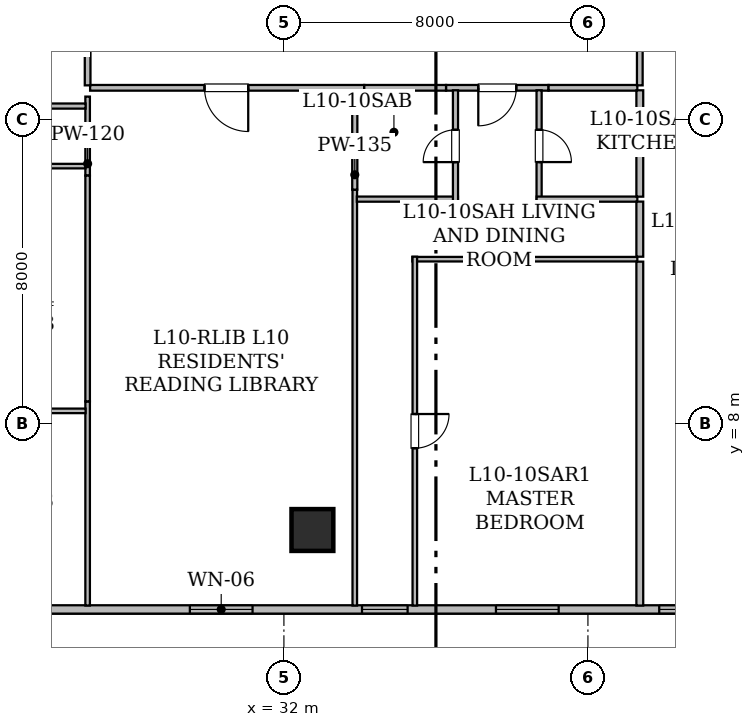
"""IFC4 building model, lengths in metres.
Left out: names, types, materials, properties, quantities, classifications, styles, units other than length and angle.
Written with IfcOpenShell. Run it as: python <this file> out.ifc"""

import sys

from ifc_helpers import new_model, si_unit, direction, frame, frame_2d, origin, origin_2d, place, context, subcontext, project, spatial, rectangle, hollow_rectangle, extrude, element, fill, save


model = new_model("IFC4")
c1 = context("Model", 3, precision=1e-05, world=origin(), true_north=direction((0.0, 1.0)))
c2 = subcontext(c1, "Body", "Model", "MODEL_VIEW")
j1 = project(units=[si_unit("LENGTHUNIT", "METRE"), si_unit("PLANEANGLEUNIT", "RADIAN")], contexts=[c1])
p1 = place(None, origin())
s1 = spatial("IfcSite", under=j1, at=p1, CompositionType="ELEMENT")
p2 = place(p1, origin())
s2 = spatial("IfcBuilding", under=s1, at=p2, CompositionType="ELEMENT")
p3 = place(p2, frame((0.0, 0.0, 44.25)))
s3 = spatial("IfcBuildingStorey", under=s2, at=p3, CompositionType="ELEMENT", Elevation=44.25)
p4 = place(p3, frame((32.75, 5.2, 0.0), z_axis=(0.0, 0.0, 1.0), x_axis=(1.0, 0.0, 0.0)))
e1 = element("IfcColumn", 1, at=p4, inside=s3, PredefinedType="COLUMN", context=c2, shape_type="SweptSolid", body=[
    extrude(hollow_rectangle(XDim=1.1, YDim=1.1, WallThickness=0.055, at=origin_2d()), origin(), (0.0, 0.0, 1.0), 3.65),
])
p5 = place(p3, frame((45.683, 3.11, 0.0), z_axis=(0.0, 0.0, 1.0), x_axis=(-1.0, 0.0, 0.0)))
e2 = element("IfcWall", 2, at=p5, inside=s3, PredefinedType="STANDARD", context=c2, shape_type="SweptSolid", body=[
    extrude(rectangle(XDim=37.368, YDim=0.22, at=frame_2d((18.684, 0.0))), origin(), (0.0, 0.0, 1.0), 3.43),
])
p6 = place(p5, frame((14.508, 0.0, 0.85)))
e3 = element("IfcOpeningElement", 3, at=p6, cuts=e2, PredefinedType="OPENING", context=c2, shape_type="SweptSolid", body=[
    extrude(rectangle(XDim=1.65, YDim=1.55, at=frame_2d((0.825, 0.775))), frame((0.0, 0.12, 0.0), z_axis=(0.0, -1.0, 0.0), x_axis=(1.0, 0.0, 0.0)), (0.0, 0.0, 1.0), 0.24),
])
p7 = place(p5, frame((33.025, 0.0, 0.85)))
e4 = element("IfcOpeningElement", 4, at=p7, cuts=e2, PredefinedType="OPENING", context=c2, shape_type="SweptSolid", body=[
    extrude(rectangle(XDim=1.65, YDim=1.55, at=frame_2d((0.825, 0.775))), frame((0.0, 0.12, 0.0), z_axis=(0.0, -1.0, 0.0), x_axis=(1.0, 0.0, 0.0)), (0.0, 0.0, 1.0), 0.24),
])
p8 = place(p5, frame((24.713, 0.0, 0.8)))
e5 = element("IfcOpeningElement", 5, at=p8, cuts=e2, PredefinedType="OPENING", context=c2, shape_type="SweptSolid", body=[
    extrude(rectangle(XDim=1.2, YDim=1.5, at=frame_2d((0.6, 0.75))), frame((0.0, 0.12, 0.0), z_axis=(0.0, -1.0, 0.0), x_axis=(1.0, 0.0, 0.0)), (0.0, 0.0, 1.0), 0.24),
])
p9 = place(p5, frame((28.113, 0.0, 0.85)))
e6 = element("IfcOpeningElement", 6, at=p9, cuts=e2, PredefinedType="OPENING", context=c2, shape_type="SweptSolid", body=[
    extrude(rectangle(XDim=1.65, YDim=1.55, at=frame_2d((0.825, 0.775))), frame((0.0, 0.12, 0.0), z_axis=(0.0, -1.0, 0.0), x_axis=(1.0, 0.0, 0.0)), (0.0, 0.0, 1.0), 0.24),
])
p10 = place(p5, frame((20.863, 0.0, 0.85)))
e7 = element("IfcOpeningElement", 7, at=p10, cuts=e2, PredefinedType="OPENING", context=c2, shape_type="SweptSolid", body=[
    extrude(rectangle(XDim=1.65, YDim=1.55, at=frame_2d((0.825, 0.775))), frame((0.0, 0.12, 0.0), z_axis=(0.0, -1.0, 0.0), x_axis=(1.0, 0.0, 0.0)), (0.0, 0.0, 1.0), 0.24),
])
p11 = place(p5, frame((10.428, 0.0, 0.8)))
e8 = element("IfcOpeningElement", 8, at=p11, cuts=e2, PredefinedType="OPENING", context=c2, shape_type="SweptSolid", body=[
    extrude(rectangle(XDim=1.2, YDim=1.5, at=frame_2d((0.6, 0.75))), frame((0.0, 0.12, 0.0), z_axis=(0.0, -1.0, 0.0), x_axis=(1.0, 0.0, 0.0)), (0.0, 0.0, 1.0), 0.24),
])
p12 = place(p5, frame((6.453, 0.0, 0.85)))
e9 = element("IfcOpeningElement", 9, at=p12, cuts=e2, PredefinedType="OPENING", context=c2, shape_type="SweptSolid", body=[
    extrude(rectangle(XDim=1.65, YDim=1.55, at=frame_2d((0.825, 0.775))), frame((0.0, 0.12, 0.0), z_axis=(0.0, -1.0, 0.0), x_axis=(1.0, 0.0, 0.0)), (0.0, 0.0, 1.0), 0.24),
])
p13 = place(p5, frame((2.157, 0.0, 0.85)))
e10 = element("IfcOpeningElement", 10, at=p13, cuts=e2, PredefinedType="OPENING", context=c2, shape_type="SweptSolid", body=[
    extrude(rectangle(XDim=1.65, YDim=1.55, at=frame_2d((0.825, 0.775))), frame((0.0, 0.12, 0.0), z_axis=(0.0, -1.0, 0.0), x_axis=(1.0, 0.0, 0.0)), (0.0, 0.0, 1.0), 0.24),
])
p14 = place(p3, frame((34.114, 16.835, 0.0), z_axis=(0.0, 0.0, 1.0), x_axis=(-1.0, 0.0, 0.0)))
e11 = element("IfcWall", 11, at=p14, inside=s3, PredefinedType="STANDARD", context=c2, shape_type="SweptSolid", body=[
    extrude(rectangle(XDim=7.214, YDim=0.15, at=frame_2d((3.607, 0.0))), origin(), (0.0, 0.0, 1.0), 2.647),
])
p15 = place(p14, frame((3.053, 0.0, 0.0)))
e12 = element("IfcOpeningElement", 12, at=p15, cuts=e11, PredefinedType="OPENING", context=c2, shape_type="SweptSolid", body=[
    extrude(rectangle(XDim=1.15, YDim=2.2, at=frame_2d((0.575, 1.1))), frame((0.0, 0.085, 0.0), z_axis=(0.0, -1.0, 0.0), x_axis=(1.0, 0.0, 0.0)), (0.0, 0.0, 1.0), 0.17),
])
p16 = place(p3, frame((26.835, 16.9, 0.0), z_axis=(0.0, 0.0, 1.0), x_axis=(0.0, 1.0, 0.0)))
e13 = element("IfcWall", 13, at=p16, inside=s3, PredefinedType="STANDARD", context=c2, shape_type="SweptSolid", body=[
    extrude(rectangle(XDim=3.1, YDim=0.15, at=frame_2d((1.55, 0.0))), origin(), (0.0, 0.0, 1.0), 2.647),
])
p17 = place(p3, frame((38.964, 16.835, 0.0), z_axis=(0.0, 0.0, 1.0), x_axis=(-1.0, 0.0, 0.0)))
e14 = element("IfcWall", 14, at=p17, inside=s3, PredefinedType="STANDARD", context=c2, shape_type="SweptSolid", body=[
    extrude(rectangle(XDim=2.698, YDim=0.15, at=frame_2d((1.349, 0.0))), origin(), (0.0, 0.0, 1.0), 3.43),
])
p18 = place(p17, frame((0.849, 0.0, 0.0)))
e15 = element("IfcOpeningElement", 15, at=p18, cuts=e14, PredefinedType="OPENING", context=c2, shape_type="SweptSolid", body=[
    extrude(rectangle(XDim=1.0, YDim=2.15, at=frame_2d((0.5, 1.075))), frame((0.0, 0.085, 0.0), z_axis=(0.0, -1.0, 0.0), x_axis=(1.0, 0.0, 0.0)), (0.0, 0.0, 1.0), 0.17),
])
p19 = place(p3, frame((36.266, 16.835, 0.0), z_axis=(0.0, 0.0, 1.0), x_axis=(-1.0, 0.0, 0.0)))
e16 = element("IfcWall", 16, at=p19, inside=s3, PredefinedType="STANDARD", context=c2, shape_type="SweptSolid", body=[
    extrude(rectangle(XDim=2.152, YDim=0.15, at=frame_2d((1.076, 0.0))), origin(), (0.0, 0.0, 1.0), 3.43),
])
p20 = place(p3, frame((41.3, 16.835, 0.0), z_axis=(0.0, 0.0, 1.0), x_axis=(-1.0, 0.0, 0.0)))
e17 = element("IfcWall", 17, at=p20, inside=s3, PredefinedType="STANDARD", context=c2, shape_type="SweptSolid", body=[
    extrude(rectangle(XDim=2.336, YDim=0.15, at=frame_2d((1.168, 0.0))), origin(), (0.0, 0.0, 1.0), 3.43),
])
p21 = place(p3, frame((41.365, 18.618, 0.0), z_axis=(0.0, 0.0, 1.0), x_axis=(0.0, -1.0, 0.0)))
e18 = element("IfcWall", 18, at=p21, inside=s3, PredefinedType="STANDARD", context=c2, shape_type="SweptSolid", body=[
    extrude(rectangle(XDim=1.718, YDim=0.15, at=frame_2d((0.859, 0.0))), origin(), (0.0, 0.0, 1.0), 2.647),
])
p22 = place(p3, frame((26.835, 14.526, 0.0), z_axis=(0.0, 0.0, 1.0), x_axis=(0.0, 1.0, 0.0)))
e19 = element("IfcWall", 19, at=p22, inside=s3, PredefinedType="PARTITIONING", context=c2, shape_type="SweptSolid", body=[
    extrude(rectangle(XDim=2.078, YDim=0.12, at=frame_2d((1.039, 0.0))), origin(), (0.0, 0.0, 1.0), 3.43),
])
p23 = place(p3, frame((26.835, 3.212, 0.0), z_axis=(0.0, 0.0, 1.0), x_axis=(0.0, 1.0, 0.0)))
e20 = element("IfcWall", 20, at=p23, inside=s3, PredefinedType="PARTITIONING", context=c2, shape_type="SweptSolid", body=[
    extrude(rectangle(XDim=5.372, YDim=0.12, at=frame_2d((2.686, 0.0))), origin(), (0.0, 0.0, 1.0), 2.803),
])
p24 = place(p3, frame((26.835, 8.584, 0.0), z_axis=(0.0, 0.0, 1.0), x_axis=(0.0, 1.0, 0.0)))
e21 = element("IfcWall", 21, at=p24, inside=s3, PredefinedType="PARTITIONING", context=c2, shape_type="SweptSolid", body=[
    extrude(rectangle(XDim=5.942, YDim=0.12, at=frame_2d((2.971, 0.0))), origin(), (0.0, 0.0, 1.0), 3.43),
])
p25 = place(p3, frame((33.865, 14.155, 0.0), z_axis=(0.0, 0.0, 1.0), x_axis=(0.0, -1.0, 0.0)))
e22 = element("IfcWall", 22, at=p25, inside=s3, PredefinedType="PARTITIONING", context=c2, shape_type="SweptSolid", body=[
    extrude(rectangle(XDim=10.943, YDim=0.12, at=frame_2d((5.472, 0.0))), origin(), (0.0, 0.0, 1.0), 2.803),
])
p26 = place(p3, frame((33.865, 16.77, 0.0), z_axis=(0.0, 0.0, 1.0), x_axis=(0.0, -1.0, 0.0)))
e23 = element("IfcWall", 23, at=p26, inside=s3, PredefinedType="PARTITIONING", context=c2, shape_type="SweptSolid", body=[
    extrude(rectangle(XDim=2.615, YDim=0.135, at=frame_2d((1.308, 0.0))), origin(), (0.0, 0.0, 1.0), 3.43),
])
p27 = place(p3, frame((21.405, 16.355, 0.0), z_axis=(0.0, 0.0, 1.0), x_axis=(1.0, 0.0, 0.0)))
e24 = element("IfcWall", 24, at=p27, inside=s3, PredefinedType="PARTITIONING", context=c2, shape_type="SweptSolid", body=[
    extrude(rectangle(XDim=5.376, YDim=0.135, at=frame_2d((2.688, 0.0))), origin(), (0.0, 0.0, 1.0), 3.43),
])
p28 = place(p27, frame((2.263, 0.0, 0.0)))
e25 = element("IfcOpeningElement", 25, at=p28, cuts=e24, PredefinedType="OPENING", context=c2, shape_type="SweptSolid", body=[
    extrude(rectangle(XDim=0.85, YDim=2.1, at=frame_2d((0.425, 1.05))), frame((0.0, 0.077, 0.0), z_axis=(0.0, -1.0, 0.0), x_axis=(1.0, 0.0, 0.0)), (0.0, 0.0, 1.0), 0.155),
])
p29 = place(p3, frame((26.781, 14.775, 0.0), z_axis=(0.0, 0.0, 1.0), x_axis=(-1.0, 0.0, 0.0)))
e26 = element("IfcWall", 26, at=p29, inside=s3, PredefinedType="PARTITIONING", context=c2, shape_type="SweptSolid", body=[
    extrude(rectangle(XDim=5.691, YDim=0.12, at=frame_2d((2.845, 0.0))), origin(), (0.0, 0.0, 1.0), 3.43),
])
p30 = place(p3, frame((21.209, 8.335, 0.0), z_axis=(0.0, 0.0, 1.0), x_axis=(1.0, 0.0, 0.0)))
e27 = element("IfcWall", 27, at=p30, inside=s3, PredefinedType="PARTITIONING", context=c2, shape_type="SweptSolid", body=[
    extrude(rectangle(XDim=5.572, YDim=0.12, at=frame_2d((2.786, 0.0))), origin(), (0.0, 0.0, 1.0), 3.43),
])
p31 = place(p3, frame((33.919, 13.906, 0.0), z_axis=(0.0, 0.0, 1.0), x_axis=(1.0, 0.0, 0.0)))
e28 = element("IfcWall", 28, at=p31, inside=s3, PredefinedType="PARTITIONING", context=c2, shape_type="SweptSolid", body=[
    extrude(rectangle(XDim=2.661, YDim=0.135, at=frame_2d((1.331, 0.0))), origin(), (0.0, 0.0, 1.0), 3.43),
])
p32 = place(p3, frame((36.515, 13.841, 0.0), z_axis=(0.0, 0.0, 1.0), x_axis=(0.0, 1.0, 0.0)))
e29 = element("IfcWall", 29, at=p32, inside=s3, PredefinedType="PARTITIONING", context=c2, shape_type="SweptSolid", body=[
    extrude(rectangle(XDim=2.929, YDim=0.135, at=frame_2d((1.464, 0.0))), origin(), (0.0, 0.0, 1.0), 3.43),
])
p33 = place(p32, frame((1.039, 0.0, 0.0)))
e30 = element("IfcOpeningElement", 30, at=p33, cuts=e29, PredefinedType="OPENING", context=c2, shape_type="SweptSolid", body=[
    extrude(rectangle(XDim=0.85, YDim=2.1, at=frame_2d((0.425, 1.05))), frame((0.0, 0.077, 0.0), z_axis=(0.0, -1.0, 0.0), x_axis=(1.0, 0.0, 0.0)), (0.0, 0.0, 1.0), 0.155),
])
p34 = place(p3, frame((38.715, 16.77, 0.0), z_axis=(0.0, 0.0, 1.0), x_axis=(0.0, -1.0, 0.0)))
e31 = element("IfcWall", 31, at=p34, inside=s3, PredefinedType="PARTITIONING", context=c2, shape_type="SweptSolid", body=[
    extrude(rectangle(XDim=2.929, YDim=0.135, at=frame_2d((1.464, 0.0))), origin(), (0.0, 0.0, 1.0), 3.43),
])
p35 = place(p34, frame((1.039, 0.0, 0.0)))
e32 = element("IfcOpeningElement", 32, at=p35, cuts=e31, PredefinedType="OPENING", context=c2, shape_type="SweptSolid", body=[
    extrude(rectangle(XDim=0.85, YDim=2.1, at=frame_2d((0.425, 1.05))), frame((0.0, 0.077, 0.0), z_axis=(0.0, -1.0, 0.0), x_axis=(1.0, 0.0, 0.0)), (0.0, 0.0, 1.0), 0.155),
])
p36 = place(p3, frame((38.65, 13.906, 0.0), z_axis=(0.0, 0.0, 1.0), x_axis=(1.0, 0.0, 0.0)))
e33 = element("IfcWall", 33, at=p36, inside=s3, PredefinedType="PARTITIONING", context=c2, shape_type="SweptSolid", body=[
    extrude(rectangle(XDim=2.65, YDim=0.135, at=frame_2d((1.325, 0.0))), origin(), (0.0, 0.0, 1.0), 3.43),
])
p37 = place(p3, frame((41.3, 12.326, 0.0), z_axis=(0.0, 0.0, 1.0), x_axis=(-1.0, 0.0, 0.0)))
e34 = element("IfcWall", 34, at=p37, inside=s3, PredefinedType="PARTITIONING", context=c2, shape_type="SweptSolid", body=[
    extrude(rectangle(XDim=5.92, YDim=0.12, at=frame_2d((2.96, 0.0))), origin(), (0.0, 0.0, 1.0), 3.43),
])
p38 = place(p3, frame((35.445, 12.391, 0.0), z_axis=(0.0, 0.0, 1.0), x_axis=(0.0, -1.0, 0.0)))
e35 = element("IfcWall", 35, at=p38, inside=s3, PredefinedType="PARTITIONING", context=c2, shape_type="SweptSolid", body=[
    extrude(rectangle(XDim=9.179, YDim=0.12, at=frame_2d((4.59, 0.0))), origin(), (0.0, 0.0, 1.0), 2.803),
])
p39 = place(p38, frame((4.139, 0.0, 0.0)))
e36 = element("IfcOpeningElement", 36, at=p39, cuts=e35, PredefinedType="OPENING", context=c2, shape_type="SweptSolid", body=[
    extrude(rectangle(XDim=0.9, YDim=2.1, at=frame_2d((0.45, 1.05))), frame((0.0, 0.07, 0.0), z_axis=(0.0, -1.0, 0.0), x_axis=(1.0, 0.0, 0.0)), (0.0, 0.0, 1.0), 0.14),
])
p40 = place(p3, frame((41.365, 13.841, 0.0), z_axis=(0.0, 0.0, 1.0), x_axis=(0.0, -1.0, 0.0)))
e37 = element("IfcWall", 37, at=p40, inside=s3, PredefinedType="STANDARD", context=c2, shape_type="SweptSolid", body=[
    extrude(rectangle(XDim=1.45, YDim=0.18, at=frame_2d((0.725, 0.0))), origin(), (0.0, 0.0, 1.0), 3.43),
])
p41 = place(p3, frame((41.365, 16.77, 0.0), z_axis=(0.0, 0.0, 1.0), x_axis=(0.0, -1.0, 0.0)))
e38 = element("IfcWall", 38, at=p41, inside=s3, PredefinedType="STANDARD", context=c2, shape_type="SweptSolid", body=[
    extrude(rectangle(XDim=2.799, YDim=0.18, at=frame_2d((1.399, 0.0))), origin(), (0.0, 0.0, 1.0), 3.43),
])
p42 = place(p3, frame((41.365, 12.261, 0.0), z_axis=(0.0, 0.0, 1.0), x_axis=(0.0, -1.0, 0.0)))
e39 = element("IfcWall", 39, at=p42, inside=s3, PredefinedType="STANDARD", context=c2, shape_type="SweptSolid", body=[
    extrude(rectangle(XDim=9.049, YDim=0.18, at=frame_2d((4.524, 0.0))), origin(), (0.0, 0.0, 1.0), 2.803),
])
p43 = place(p6, origin())
e40 = element("IfcWindow", 40, at=p43, inside=s3, PartitioningType="SINGLE_PANEL", PredefinedType="WINDOW", context=c2, shape_type="SweptSolid", body=[
    extrude(rectangle(XDim=1.65, YDim=1.55, at=frame_2d((0.825, 0.775))), frame((0.0, 0.03, 0.0), z_axis=(0.0, -1.0, 0.0), x_axis=(1.0, 0.0, 0.0)), (0.0, 0.0, 1.0), 0.06),
])
fill(e3, e40)
p44 = place(p11, origin())
e41 = element("IfcWindow", 41, at=p44, inside=s3, PartitioningType="SINGLE_PANEL", PredefinedType="WINDOW", context=c2, shape_type="SweptSolid", body=[
    extrude(rectangle(XDim=1.2, YDim=1.5, at=frame_2d((0.6, 0.75))), frame((0.0, 0.03, 0.0), z_axis=(0.0, -1.0, 0.0), x_axis=(1.0, 0.0, 0.0)), (0.0, 0.0, 1.0), 0.06),
])
fill(e8, e41)
p45 = place(p12, origin())
e42 = element("IfcWindow", 42, at=p45, inside=s3, PartitioningType="SINGLE_PANEL", PredefinedType="WINDOW", context=c2, shape_type="SweptSolid", body=[
    extrude(rectangle(XDim=1.65, YDim=1.55, at=frame_2d((0.825, 0.775))), frame((0.0, 0.03, 0.0), z_axis=(0.0, -1.0, 0.0), x_axis=(1.0, 0.0, 0.0)), (0.0, 0.0, 1.0), 0.06),
])
fill(e9, e42)
p46 = place(p13, origin())
e43 = element("IfcWindow", 43, at=p46, inside=s3, PartitioningType="SINGLE_PANEL", PredefinedType="WINDOW", context=c2, shape_type="SweptSolid", body=[
    extrude(rectangle(XDim=1.65, YDim=1.55, at=frame_2d((0.825, 0.775))), frame((0.0, 0.03, 0.0), z_axis=(0.0, -1.0, 0.0), x_axis=(1.0, 0.0, 0.0)), (0.0, 0.0, 1.0), 0.06),
])
fill(e10, e43)
p47 = place(p15, origin())
e44 = element("IfcDoor", 44, at=p47, inside=s3, OperationType="SINGLE_SWING_LEFT", PredefinedType="DOOR", context=c2, shape_type="SweptSolid", body=[
    extrude(rectangle(XDim=1.15, YDim=2.2, at=frame_2d((0.575, 1.1))), frame((0.0, 0.025, 0.0), z_axis=(0.0, -1.0, 0.0), x_axis=(1.0, 0.0, 0.0)), (0.0, 0.0, 1.0), 0.05),
])
fill(e12, e44)
p48 = place(p18, origin())
e45 = element("IfcDoor", 45, at=p48, inside=s3, OperationType="SINGLE_SWING_RIGHT", PredefinedType="DOOR", context=c2, shape_type="SweptSolid", body=[
    extrude(rectangle(XDim=1.0, YDim=2.15, at=frame_2d((0.5, 1.075))), frame((0.0, 0.025, 0.0), z_axis=(0.0, -1.0, 0.0), x_axis=(1.0, 0.0, 0.0)), (0.0, 0.0, 1.0), 0.05),
])
fill(e15, e45)
p49 = place(p33, origin())
e46 = element("IfcDoor", 46, at=p49, inside=s3, OperationType="SINGLE_SWING_LEFT", PredefinedType="DOOR", context=c2, shape_type="SweptSolid", body=[
    extrude(rectangle(XDim=0.85, YDim=2.1, at=frame_2d((0.425, 1.05))), frame((0.0, 0.025, 0.0), z_axis=(0.0, -1.0, 0.0), x_axis=(1.0, 0.0, 0.0)), (0.0, 0.0, 1.0), 0.05),
])
fill(e30, e46)
p50 = place(p35, origin())
e47 = element("IfcDoor", 47, at=p50, inside=s3, OperationType="SINGLE_SWING_RIGHT", PredefinedType="DOOR", context=c2, shape_type="SweptSolid", body=[
    extrude(rectangle(XDim=0.85, YDim=2.1, at=frame_2d((0.425, 1.05))), frame((0.0, 0.025, 0.0), z_axis=(0.0, -1.0, 0.0), x_axis=(1.0, 0.0, 0.0)), (0.0, 0.0, 1.0), 0.05),
])
fill(e32, e47)
p51 = place(p39, origin())
e48 = element("IfcDoor", 48, at=p51, inside=s3, OperationType="SINGLE_SWING_LEFT", PredefinedType="DOOR", context=c2, shape_type="SweptSolid", body=[
    extrude(rectangle(XDim=0.9, YDim=2.1, at=frame_2d((0.45, 1.05))), frame((0.0, 0.025, 0.0), z_axis=(0.0, -1.0, 0.0), x_axis=(1.0, 0.0, 0.0)), (0.0, 0.0, 1.0), 0.05),
])
fill(e36, e48)
save(model, sys.argv[1])
